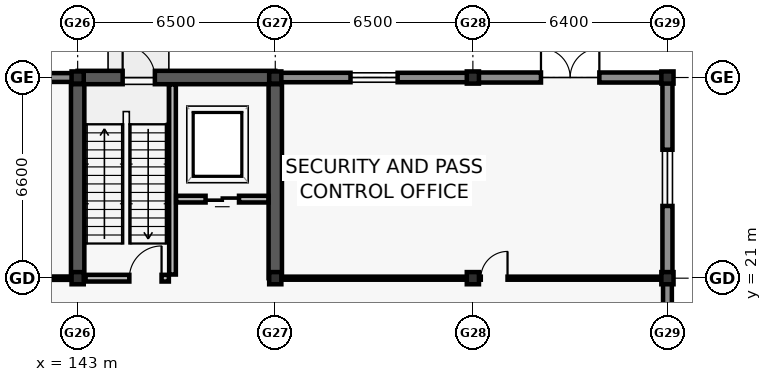
"""IFC4 building model, lengths in metres.
Left out: names, types, materials, properties, quantities, classifications, styles, units other than length and angle.
Written with IfcOpenShell. Run it as: python <this file> out.ifc"""

import sys

from ifc_helpers import new_model, si_unit, direction, frame, frame_2d, origin, origin_2d, place, context, subcontext, project, spatial, rectangle, i_section, extrude, element, fill, save


model = new_model("IFC4")
c1 = context("Model", 3, precision=1e-05, world=origin(), true_north=direction((0.0, 1.0)))
c2 = subcontext(c1, "Body", "Model", "MODEL_VIEW")
j1 = project(units=[si_unit("LENGTHUNIT", "METRE"), si_unit("PLANEANGLEUNIT", "RADIAN")], contexts=[c1])
p1 = place(None, origin())
s1 = spatial("IfcSite", under=j1, at=p1, CompositionType="ELEMENT")
p2 = place(p1, origin())
s2 = spatial("IfcBuilding", under=s1, at=p2, CompositionType="ELEMENT")
p3 = place(p2, origin())
s3 = spatial("IfcBuildingStorey", under=s2, at=p3, CompositionType="ELEMENT", Elevation=0.0)
for number, where, z_axis, x_axis in (
    (1, (143.0, 21.0, 0.0), (0.0, 0.0, 1.0), (1.0, 0.0, 0.0)),
    (2, (143.0, 27.6, 0.0), (0.0, 0.0, 1.0), (1.0, 0.0, 0.0)),
    (3, (149.5, 21.0, 0.0), (0.0, 0.0, 1.0), (1.0, 0.0, 0.0)),
    (4, (149.5, 27.6, 0.0), (0.0, 0.0, 1.0), (1.0, 0.0, 0.0)),
    (5, (156.0, 21.0, 0.0), (0.0, 0.0, 1.0), (1.0, 0.0, 0.0)),
    (6, (156.0, 27.6, 0.0), (0.0, 0.0, 1.0), (1.0, 0.0, 0.0)),
    (7, (162.4, 21.0, 0.0), (0.0, 0.0, 1.0), (1.0, 0.0, 0.0)),
    (8, (162.4, 27.6, 0.0), (0.0, 0.0, 1.0), (1.0, 0.0, 0.0)),
):
    element("IfcColumn", number, at=place(p3, frame(where, z_axis=z_axis, x_axis=x_axis)), inside=s3, PredefinedType="COLUMN", context=c2, shape_type="SweptSolid", body=[
        extrude(i_section(OverallWidth=0.4, OverallDepth=0.4, WebThickness=0.02, FlangeThickness=0.032, at=origin_2d()), origin(), (0.0, 0.0, 1.0), 5.4),
    ])
p4 = place(p3, frame((143.0, 27.6, 0.0), z_axis=(0.0, 0.0, 1.0), x_axis=(1.0, 0.0, 0.0)))
e9 = element("IfcWall", 9, at=p4, inside=s3, PredefinedType="SHEAR", context=c2, shape_type="SweptSolid", body=[
    extrude(rectangle(XDim=6.5, YDim=0.44, at=frame_2d((3.25, 0.0))), origin(), (0.0, 0.0, 1.0), 5.16),
])
p5 = place(p4, frame((1.48, 0.0, 0.0)))
e10 = element("IfcOpeningElement", 10, at=p5, cuts=e9, PredefinedType="OPENING", context=c2, shape_type="SweptSolid", body=[
    extrude(rectangle(XDim=1.06, YDim=2.12, at=frame_2d((0.53, 1.06))), frame((0.0, 0.23, 0.0), z_axis=(0.0, -1.0, 0.0), x_axis=(1.0, 0.0, 0.0)), (0.0, 0.0, 1.0), 0.46),
])
for number, where, z_axis, x_axis in (
    (11, (143.0, 21.0, 0.0), (0.0, 0.0, 1.0), (0.0, 1.0, 0.0)),
    (12, (149.5, 21.0, 0.0), (0.0, 0.0, 1.0), (0.0, 1.0, 0.0)),
):
    element("IfcWall", number, at=place(p3, frame(where, z_axis=z_axis, x_axis=x_axis)), inside=s3, PredefinedType="SHEAR", context=c2, shape_type="SweptSolid", body=[
        extrude(rectangle(XDim=6.38, YDim=0.44, at=frame_2d((3.19, 0.0))), origin(), (0.0, 0.0, 1.0), 5.16),
    ])
p6 = place(p3, frame((136.505, 27.6, 0.0), z_axis=(0.0, 0.0, 1.0), x_axis=(1.0, 0.0, 0.0)))
e13 = element("IfcWall", 13, at=p6, inside=s3, PredefinedType="SOLIDWALL", context=c2, shape_type="SweptSolid", body=[
    extrude(rectangle(XDim=6.49, YDim=0.29, at=frame_2d((3.245, 0.0))), origin(), (0.0, 0.0, 1.0), 4.52),
])
p7 = place(p6, frame((2.545, 0.0, 0.8)))
e14 = element("IfcOpeningElement", 14, at=p7, cuts=e13, PredefinedType="OPENING", context=c2, shape_type="SweptSolid", body=[
    extrude(rectangle(XDim=1.4, YDim=1.5, at=frame_2d((0.7, 0.75))), frame((0.0, 0.155, 0.0), z_axis=(0.0, -1.0, 0.0), x_axis=(1.0, 0.0, 0.0)), (0.0, 0.0, 1.0), 0.31),
])
p8 = place(p3, frame((149.505, 27.6, 0.0), z_axis=(0.0, 0.0, 1.0), x_axis=(1.0, 0.0, 0.0)))
e15 = element("IfcWall", 15, at=p8, inside=s3, PredefinedType="SOLIDWALL", context=c2, shape_type="SweptSolid", body=[
    extrude(rectangle(XDim=6.49, YDim=0.31, at=frame_2d((3.245, 0.0))), origin(), (0.0, 0.0, 1.0), 4.52),
])
p9 = place(p8, frame((2.47, 0.0, 0.8)))
e16 = element("IfcOpeningElement", 16, at=p9, cuts=e15, PredefinedType="OPENING", context=c2, shape_type="SweptSolid", body=[
    extrude(rectangle(XDim=1.55, YDim=1.5, at=frame_2d((0.775, 0.75))), frame((0.0, 0.165, 0.0), z_axis=(0.0, -1.0, 0.0), x_axis=(1.0, 0.0, 0.0)), (0.0, 0.0, 1.0), 0.33),
])
p10 = place(p3, frame((156.005, 27.6, 0.0), z_axis=(0.0, 0.0, 1.0), x_axis=(1.0, 0.0, 0.0)))
e17 = element("IfcWall", 17, at=p10, inside=s3, PredefinedType="SOLIDWALL", context=c2, shape_type="SweptSolid", body=[
    extrude(rectangle(XDim=6.39, YDim=0.33, at=frame_2d((3.195, 0.0))), origin(), (0.0, 0.0, 1.0), 4.52),
])
p11 = place(p10, frame((2.235, 0.0, 0.0)))
e18 = element("IfcOpeningElement", 18, at=p11, cuts=e17, PredefinedType="OPENING", context=c2, shape_type="SweptSolid", body=[
    extrude(rectangle(XDim=1.92, YDim=2.25, at=frame_2d((0.96, 1.125))), frame((0.0, 0.175, 0.0), z_axis=(0.0, -1.0, 0.0), x_axis=(1.0, 0.0, 0.0)), (0.0, 0.0, 1.0), 0.35),
])
p12 = place(p3, frame((162.4, 20.995, 0.0), z_axis=(0.0, 0.0, 1.0), x_axis=(0.0, -1.0, 0.0)))
e19 = element("IfcWall", 19, at=p12, inside=s3, PredefinedType="SOLIDWALL", context=c2, shape_type="SweptSolid", body=[
    extrude(rectangle(XDim=6.59, YDim=0.29, at=frame_2d((3.295, 0.0))), origin(), (0.0, 0.0, 1.0), 4.52),
])
p13 = place(p12, frame((3.978, 0.0, 0.8)))
e20 = element("IfcOpeningElement", 20, at=p13, cuts=e19, PredefinedType="OPENING", context=c2, shape_type="SweptSolid", body=[
    extrude(rectangle(XDim=1.4, YDim=1.65, at=frame_2d((0.7, 0.825))), frame((0.0, 0.155, 0.0), z_axis=(0.0, -1.0, 0.0), x_axis=(1.0, 0.0, 0.0)), (0.0, 0.0, 1.0), 0.31),
])
p14 = place(p3, frame((162.4, 27.595, 0.0), z_axis=(0.0, 0.0, 1.0), x_axis=(0.0, -1.0, 0.0)))
e21 = element("IfcWall", 21, at=p14, inside=s3, PredefinedType="SOLIDWALL", context=c2, shape_type="SweptSolid", body=[
    extrude(rectangle(XDim=6.59, YDim=0.33, at=frame_2d((3.295, 0.0))), origin(), (0.0, 0.0, 1.0), 4.52),
])
p15 = place(p14, frame((2.37, 0.0, 0.8)))
e22 = element("IfcOpeningElement", 22, at=p15, cuts=e21, PredefinedType="OPENING", context=c2, shape_type="SweptSolid", body=[
    extrude(rectangle(XDim=1.85, YDim=1.55, at=frame_2d((0.925, 0.775))), frame((0.0, 0.175, 0.0), z_axis=(0.0, -1.0, 0.0), x_axis=(1.0, 0.0, 0.0)), (0.0, 0.0, 1.0), 0.35),
])
p16 = place(p3, frame((146.12, 21.12, 0.0), z_axis=(0.0, 0.0, 1.0), x_axis=(0.0, 1.0, 0.0)))
e23 = element("IfcWall", 23, at=p16, inside=s3, PredefinedType="SOLIDWALL", context=c2, shape_type="SweptSolid", body=[
    extrude(rectangle(XDim=6.255, YDim=0.22, at=frame_2d((3.127, 0.0))), origin(), (0.0, 0.0, 1.0), 5.16),
])
p17 = place(p3, frame((143.26, 21.0, 0.0), z_axis=(0.0, 0.0, 1.0), x_axis=(1.0, 0.0, 0.0)))
e24 = element("IfcWall", 24, at=p17, inside=s3, PredefinedType="SOLIDWALL", context=c2, shape_type="SweptSolid", body=[
    extrude(rectangle(XDim=2.74, YDim=0.22, at=frame_2d((1.37, 0.0))), origin(), (0.0, 0.0, 1.0), 4.52),
])
p18 = place(p17, frame((1.44, 0.0, 0.0)))
e25 = element("IfcOpeningElement", 25, at=p18, cuts=e24, PredefinedType="OPENING", context=c2, shape_type="SweptSolid", body=[
    extrude(rectangle(XDim=1.06, YDim=2.1, at=frame_2d((0.53, 1.05))), frame((0.0, 0.12, 0.0), z_axis=(0.0, -1.0, 0.0), x_axis=(1.0, 0.0, 0.0)), (0.0, 0.0, 1.0), 0.24),
])
p19 = place(p3, frame((146.24, 23.6, 0.0), z_axis=(0.0, 0.0, 1.0), x_axis=(1.0, 0.0, 0.0)))
e26 = element("IfcWall", 26, at=p19, inside=s3, PredefinedType="SOLIDWALL", context=c2, shape_type="SweptSolid", body=[
    extrude(rectangle(XDim=3.035, YDim=0.22, at=frame_2d((1.518, 0.0))), origin(), (0.0, 0.0, 1.0), 5.16),
])
p20 = place(p19, frame((0.968, 0.0, 0.0)))
e27 = element("IfcOpeningElement", 27, at=p20, cuts=e26, PredefinedType="OPENING", context=c2, shape_type="SweptSolid", body=[
    extrude(rectangle(XDim=1.1, YDim=2.1, at=frame_2d((0.55, 1.05))), frame((0.0, 0.12, 0.0), z_axis=(0.0, -1.0, 0.0), x_axis=(1.0, 0.0, 0.0)), (0.0, 0.0, 1.0), 0.24),
])
p21 = place(p3, frame((136.72, 21.0, 0.0), z_axis=(0.0, 0.0, 1.0), x_axis=(1.0, 0.0, 0.0)))
e28 = element("IfcWall", 28, at=p21, inside=s3, PredefinedType="PARTITIONING", context=c2, shape_type="SweptSolid", body=[
    extrude(rectangle(XDim=6.06, YDim=0.11, at=frame_2d((3.03, 0.0))), origin(), (0.0, 0.0, 1.0), 4.5),
])
p22 = place(p21, frame((2.11, 0.0, 0.0)))
e29 = element("IfcOpeningElement", 29, at=p22, cuts=e28, PredefinedType="OPENING", context=c2, shape_type="SweptSolid", body=[
    extrude(rectangle(XDim=1.84, YDim=2.22, at=frame_2d((0.92, 1.11))), frame((0.0, 0.065, 0.0), z_axis=(0.0, -1.0, 0.0), x_axis=(1.0, 0.0, 0.0)), (0.0, 0.0, 1.0), 0.13),
])
p23 = place(p3, frame((149.72, 21.0, 0.0), z_axis=(0.0, 0.0, 1.0), x_axis=(1.0, 0.0, 0.0)))
e30 = element("IfcWall", 30, at=p23, inside=s3, PredefinedType="PARTITIONING", context=c2, shape_type="SweptSolid", body=[
    extrude(rectangle(XDim=12.46, YDim=0.1, at=frame_2d((6.23, 0.0))), origin(), (0.0, 0.0, 1.0), 4.5),
])
p24 = place(p23, frame((6.54, 0.0, 0.0)))
e31 = element("IfcOpeningElement", 31, at=p24, cuts=e30, PredefinedType="OPENING", context=c2, shape_type="SweptSolid", body=[
    extrude(rectangle(XDim=0.88, YDim=2.04, at=frame_2d((0.44, 1.02))), frame((0.0, 0.06, 0.0), z_axis=(0.0, -1.0, 0.0), x_axis=(1.0, 0.0, 0.0)), (0.0, 0.0, 1.0), 0.12),
])
p25 = place(p9, origin())
e32 = element("IfcWindow", 32, at=p25, inside=s3, PartitioningType="SINGLE_PANEL", PredefinedType="WINDOW", context=c2, shape_type="SweptSolid", body=[
    extrude(rectangle(XDim=1.55, YDim=1.5, at=frame_2d((0.775, 0.75))), frame((0.0, 0.03, 0.0), z_axis=(0.0, -1.0, 0.0), x_axis=(1.0, 0.0, 0.0)), (0.0, 0.0, 1.0), 0.06),
])
fill(e16, e32)
p26 = place(p11, origin())
e33 = element("IfcDoor", 33, at=p26, inside=s3, OperationType="DOUBLE_DOOR_SINGLE_SWING", PredefinedType="DOOR", context=c2, shape_type="SweptSolid", body=[
    extrude(rectangle(XDim=1.92, YDim=2.25, at=frame_2d((0.96, 1.125))), frame((0.0, 0.025, 0.0), z_axis=(0.0, -1.0, 0.0), x_axis=(1.0, 0.0, 0.0)), (0.0, 0.0, 1.0), 0.05),
])
fill(e18, e33)
p27 = place(p15, origin())
e34 = element("IfcWindow", 34, at=p27, inside=s3, PartitioningType="DOUBLE_PANEL_VERTICAL", PredefinedType="WINDOW", context=c2, shape_type="SweptSolid", body=[
    extrude(rectangle(XDim=1.85, YDim=1.55, at=frame_2d((0.925, 0.775))), frame((0.0, 0.03, 0.0), z_axis=(0.0, -1.0, 0.0), x_axis=(1.0, 0.0, 0.0)), (0.0, 0.0, 1.0), 0.06),
])
fill(e22, e34)
p28 = place(p18, origin())
e35 = element("IfcDoor", 35, at=p28, inside=s3, OperationType="SINGLE_SWING_RIGHT", PredefinedType="DOOR", context=c2, shape_type="SweptSolid", body=[
    extrude(rectangle(XDim=1.06, YDim=2.1, at=frame_2d((0.53, 1.05))), frame((0.0, 0.025, 0.0), z_axis=(0.0, -1.0, 0.0), x_axis=(1.0, 0.0, 0.0)), (0.0, 0.0, 1.0), 0.05),
])
fill(e25, e35)
p29 = place(p5, origin())
e36 = element("IfcDoor", 36, at=p29, inside=s3, OperationType="SINGLE_SWING_LEFT", PredefinedType="DOOR", context=c2, shape_type="SweptSolid", body=[
    extrude(rectangle(XDim=1.06, YDim=2.12, at=frame_2d((0.53, 1.06))), frame((0.0, 0.025, 0.0), z_axis=(0.0, -1.0, 0.0), x_axis=(1.0, 0.0, 0.0)), (0.0, 0.0, 1.0), 0.05),
])
fill(e10, e36)
p30 = place(p20, origin())
e37 = element("IfcDoor", 37, at=p30, inside=s3, OperationType="DOUBLE_DOOR_SLIDING", PredefinedType="DOOR", context=c2, shape_type="SweptSolid", body=[
    extrude(rectangle(XDim=1.1, YDim=2.1, at=frame_2d((0.55, 1.05))), frame((0.0, 0.025, 0.0), z_axis=(0.0, -1.0, 0.0), x_axis=(1.0, 0.0, 0.0)), (0.0, 0.0, 1.0), 0.05),
])
fill(e27, e37)
p31 = place(p24, origin())
e38 = element("IfcDoor", 38, at=p31, inside=s3, OperationType="SINGLE_SWING_RIGHT", PredefinedType="DOOR", context=c2, shape_type="SweptSolid", body=[
    extrude(rectangle(XDim=0.88, YDim=2.04, at=frame_2d((0.44, 1.02))), frame((0.0, 0.025, 0.0), z_axis=(0.0, -1.0, 0.0), x_axis=(1.0, 0.0, 0.0)), (0.0, 0.0, 1.0), 0.05),
])
fill(e31, e38)
save(model, sys.argv[1])
